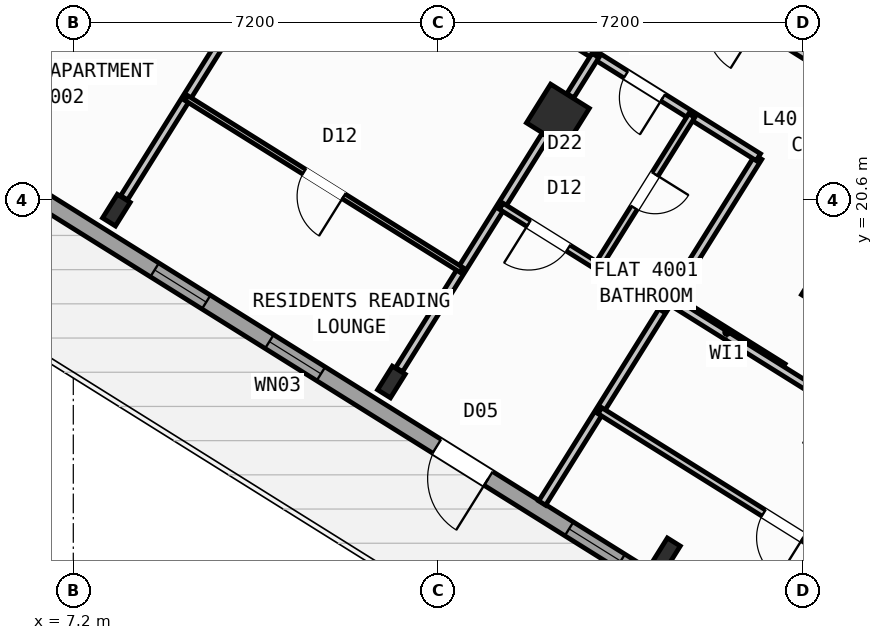
"""IFC4 building model, lengths in metres.
Left out: names, types, materials, properties, quantities, classifications, styles, units other than length and angle.
Written with IfcOpenShell. Run it as: python <this file> out.ifc"""

import sys

from ifc_helpers import new_model, si_unit, direction, frame, frame_2d, origin, origin_2d, place, context, subcontext, project, spatial, rectangle, hollow_rectangle, i_section, extrude, source, transform, mapped, element, fill, save


model = new_model("IFC4")
c1 = context("Model", 3, precision=1e-05, world=origin(), true_north=direction((0.0, 1.0)))
c2 = subcontext(c1, "Body", "Model", "MODEL_VIEW")
j1 = project(units=[si_unit("LENGTHUNIT", "METRE"), si_unit("PLANEANGLEUNIT", "RADIAN")], contexts=[c1])
p1 = place(None, origin())
s1 = spatial("IfcSite", under=j1, at=p1, CompositionType="ELEMENT")
p2 = place(p1, origin())
s2 = spatial("IfcBuilding", under=s1, at=p2, CompositionType="ELEMENT")
p3 = place(p2, frame((0.0, 0.0, 158.7)))
s3 = spatial("IfcBuildingStorey", under=s2, at=p3, CompositionType="ELEMENT", Elevation=158.7)
m1 = source(origin(), c2, "Body", "SweptSolid", [
    extrude(hollow_rectangle(XDim=0.9, YDim=0.9, WallThickness=0.036, at=origin_2d()), origin(), (0.0, 0.0, 1.0), 3.6),
])
p4 = place(p3, frame((22.191, 18.87, 0.0), z_axis=(0.0, 0.0, 1.0), x_axis=(-0.848048096156, 0.529919264233, 0.0)))
e1 = element("IfcColumn", 1, at=p4, inside=s3, PredefinedType="COLUMN", context=c2, shape_type="MappedRepresentation", body=[
    mapped(m1, transform((0.0, 0.0, 0.0), scale=1.0)),
])
m2 = source(origin(), c2, "Body", "SweptSolid", [
    extrude(i_section(OverallWidth=0.3, OverallDepth=0.55, WebThickness=0.015, FlangeThickness=0.029, at=origin_2d()), origin(), (0.0, 0.0, 1.0), 3.6),
])
p5 = place(p3, frame((18.906, 13.612, 0.0), z_axis=(0.0, 0.0, 1.0), x_axis=(-0.848048096156, 0.529919264233, 0.0)))
e2 = element("IfcColumn", 2, at=p5, inside=s3, PredefinedType="COLUMN", context=c2, shape_type="MappedRepresentation", body=[
    mapped(m2, transform((0.0, 0.0, 0.0), scale=1.0)),
])
p6 = place(p3, frame((16.764, 22.261, 0.0), z_axis=(0.0, 0.0, 1.0), x_axis=(-0.848048096156, 0.529919264233, 0.0)))
e3 = element("IfcColumn", 3, at=p6, inside=s3, PredefinedType="COLUMN", context=c2, shape_type="MappedRepresentation", body=[
    mapped(m1, transform((0.0, 0.0, 0.0), scale=1.0)),
])
for number, where, z_axis, x_axis in (
    (4, (13.478, 17.003, 0.0), (0.0, 0.0, 1.0), (-0.848, 0.53, 0.0)),
    (5, (8.051, 20.395, 0.0), (0.0, 0.0, 1.0), (-0.848, 0.53, 0.0)),
):
    element("IfcColumn", number, at=place(p3, frame(where, z_axis=z_axis, x_axis=x_axis)), inside=s3, PredefinedType="COLUMN", context=c2, shape_type="MappedRepresentation", body=[
        mapped(m2, transform((0.0, 0.0, 0.0), scale=1.0)),
    ])
p7 = place(p3, frame((29.268, 6.429, 0.0), z_axis=(0.0, 0.0, 1.0), x_axis=(-0.848049971435, 0.529916263149, 0.0)))
e6 = element("IfcWall", 6, at=p7, inside=s3, PredefinedType="STANDARD", context=c2, shape_type="SweptSolid", body=[
    extrude(rectangle(XDim=31.588, YDim=0.32, at=frame_2d((15.794, 0.0))), origin(), (0.0, 0.0, 1.0), 3.35),
])
p8 = place(p7, frame((16.362, 0.0, 0.0)))
e7 = element("IfcOpeningElement", 7, at=p8, cuts=e6, PredefinedType="OPENING", context=c2, shape_type="SweptSolid", body=[
    extrude(rectangle(XDim=1.2, YDim=2.15, at=frame_2d((0.6, 1.075))), frame((0.0, 0.17, 0.0), z_axis=(0.0, -1.0, 0.0), x_axis=(1.0, 0.0, 0.0)), (0.0, 0.0, 1.0), 0.34),
])
p9 = place(p7, frame((2.989, 0.0, 0.8)))
e8 = element("IfcOpeningElement", 8, at=p9, cuts=e6, PredefinedType="OPENING", context=c2, shape_type="SweptSolid", body=[
    extrude(rectangle(XDim=2.1, YDim=1.55, at=frame_2d((1.05, 0.775))), frame((0.0, 0.17, 0.0), z_axis=(0.0, -1.0, 0.0), x_axis=(1.0, 0.0, 0.0)), (0.0, 0.0, 1.0), 0.34),
])
p10 = place(p7, frame((8.359, 0.0, 0.8)))
e9 = element("IfcOpeningElement", 9, at=p10, cuts=e6, PredefinedType="OPENING", context=c2, shape_type="SweptSolid", body=[
    extrude(rectangle(XDim=2.1, YDim=1.55, at=frame_2d((1.05, 0.775))), frame((0.0, 0.17, 0.0), z_axis=(0.0, -1.0, 0.0), x_axis=(1.0, 0.0, 0.0)), (0.0, 0.0, 1.0), 0.34),
])
p11 = place(p7, frame((13.284, 0.0, 0.95)))
e10 = element("IfcOpeningElement", 10, at=p11, cuts=e6, PredefinedType="OPENING", context=c2, shape_type="SweptSolid", body=[
    extrude(rectangle(XDim=1.2, YDim=1.4, at=frame_2d((0.6, 0.7))), frame((0.0, 0.17, 0.0), z_axis=(0.0, -1.0, 0.0), x_axis=(1.0, 0.0, 0.0)), (0.0, 0.0, 1.0), 0.34),
])
p12 = place(p7, frame((20.259, 0.0, 0.95)))
e11 = element("IfcOpeningElement", 11, at=p12, cuts=e6, PredefinedType="OPENING", context=c2, shape_type="SweptSolid", body=[
    extrude(rectangle(XDim=1.2, YDim=1.4, at=frame_2d((0.6, 0.7))), frame((0.0, 0.17, 0.0), z_axis=(0.0, -1.0, 0.0), x_axis=(1.0, 0.0, 0.0)), (0.0, 0.0, 1.0), 0.34),
])
p13 = place(p7, frame((22.929, 0.0, 0.95)))
e12 = element("IfcOpeningElement", 12, at=p13, cuts=e6, PredefinedType="OPENING", context=c2, shape_type="SweptSolid", body=[
    extrude(rectangle(XDim=1.2, YDim=1.4, at=frame_2d((0.6, 0.7))), frame((0.0, 0.17, 0.0), z_axis=(0.0, -1.0, 0.0), x_axis=(1.0, 0.0, 0.0)), (0.0, 0.0, 1.0), 0.34),
])
p14 = place(p7, frame((27.481, 0.0, 0.8)))
e13 = element("IfcOpeningElement", 13, at=p14, cuts=e6, PredefinedType="OPENING", context=c2, shape_type="SweptSolid", body=[
    extrude(rectangle(XDim=2.1, YDim=1.55, at=frame_2d((1.05, 0.775))), frame((0.0, 0.17, 0.0), z_axis=(0.0, -1.0, 0.0), x_axis=(1.0, 0.0, 0.0)), (0.0, 0.0, 1.0), 0.34),
])
p15 = place(p3, frame((2.415, 23.452, 0.0), z_axis=(0.0, 0.0, 1.0), x_axis=(0.52991049553, 0.848053575387, 0.0)))
e14 = element("IfcWall", 14, at=p15, inside=s3, PredefinedType="STANDARD", context=c2, shape_type="SweptSolid", body=[
    extrude(rectangle(XDim=21.587, YDim=0.32, at=frame_2d((10.794, 0.0))), origin(), (0.0, 0.0, 1.0), 2.775),
])
p16 = place(p15, frame((1.406, 0.0, 0.8)))
e15 = element("IfcOpeningElement", 15, at=p16, cuts=e14, PredefinedType="OPENING", context=c2, shape_type="SweptSolid", body=[
    extrude(rectangle(XDim=2.1, YDim=1.55, at=frame_2d((1.05, 0.775))), frame((0.0, 0.17, 0.0), z_axis=(0.0, -1.0, 0.0), x_axis=(1.0, 0.0, 0.0)), (0.0, 0.0, 1.0), 0.34),
])
p17 = place(p15, frame((10.949, 0.0, 1.0)))
e16 = element("IfcOpeningElement", 16, at=p17, cuts=e14, PredefinedType="OPENING", context=c2, shape_type="SweptSolid", body=[
    extrude(rectangle(XDim=0.9, YDim=1.25, at=frame_2d((0.45, 0.625))), frame((0.0, 0.17, 0.0), z_axis=(0.0, -1.0, 0.0), x_axis=(1.0, 0.0, 0.0)), (0.0, 0.0, 1.0), 0.34),
])
p18 = place(p15, frame((15.369, 0.0, 0.85)))
e17 = element("IfcOpeningElement", 17, at=p18, cuts=e14, PredefinedType="OPENING", context=c2, shape_type="SweptSolid", body=[
    extrude(rectangle(XDim=1.5, YDim=1.5, at=frame_2d((0.75, 0.75))), frame((0.0, 0.17, 0.0), z_axis=(0.0, -1.0, 0.0), x_axis=(1.0, 0.0, 0.0)), (0.0, 0.0, 1.0), 0.34),
])
p19 = place(p15, frame((18.219, 0.0, 0.85)))
e18 = element("IfcOpeningElement", 18, at=p19, cuts=e14, PredefinedType="OPENING", context=c2, shape_type="SweptSolid", body=[
    extrude(rectangle(XDim=1.5, YDim=1.5, at=frame_2d((0.75, 0.75))), frame((0.0, 0.17, 0.0), z_axis=(0.0, -1.0, 0.0), x_axis=(1.0, 0.0, 0.0)), (0.0, 0.0, 1.0), 0.34),
])
p20 = place(p3, frame((21.206, 17.292, 0.0), z_axis=(0.0, 0.0, 1.0), x_axis=(-0.848050851465, 0.529914854792, 0.0)))
e19 = element("IfcWall", 19, at=p20, inside=s3, PredefinedType="PARTITIONING", context=c2, shape_type="SweptSolid", body=[
    extrude(rectangle(XDim=2.61, YDim=0.16, at=frame_2d((1.305, 0.0))), origin(), (0.0, 0.0, 1.0), 3.34),
])
p21 = place(p3, frame((20.719, 21.44, 0.0), z_axis=(0.0, 0.0, 1.0), x_axis=(-0.529906246318, -0.848056230514, 0.0)))
e20 = element("IfcWall", 20, at=p21, inside=s3, PredefinedType="PARTITIONING", context=c2, shape_type="SweptSolid", body=[
    extrude(rectangle(XDim=8.05, YDim=0.16, at=frame_2d((4.025, 0.0))), origin(), (0.0, 0.0, 1.0), 3.34),
])
p22 = place(p3, frame((21.885, 23.306, 0.0), z_axis=(0.0, 0.0, 1.0), x_axis=(-0.848052408131, 0.529912363569, 0.0)))
e21 = element("IfcWall", 21, at=p22, inside=s3, PredefinedType="PARTITIONING", context=c2, shape_type="SweptSolid", body=[
    extrude(rectangle(XDim=16.73, YDim=0.16, at=frame_2d((8.365, 0.0))), origin(), (0.0, 0.0, 1.0), 3.34),
])
p23 = place(p22, frame((1.395, 0.0, 0.0)))
e22 = element("IfcOpeningElement", 22, at=p23, cuts=e21, PredefinedType="OPENING", context=c2, shape_type="SweptSolid", body=[
    extrude(rectangle(XDim=1.0, YDim=2.1, at=frame_2d((0.5, 1.05))), frame((0.0, 0.09, 0.0), z_axis=(0.0, -1.0, 0.0), x_axis=(1.0, 0.0, 0.0)), (0.0, 0.0, 1.0), 0.18),
])
p24 = place(p22, frame((7.82, 0.0, 0.0)))
e23 = element("IfcOpeningElement", 23, at=p24, cuts=e21, PredefinedType="OPENING", context=c2, shape_type="SweptSolid", body=[
    extrude(rectangle(XDim=1.0, YDim=2.1, at=frame_2d((0.5, 1.05))), frame((0.0, 0.09, 0.0), z_axis=(0.0, -1.0, 0.0), x_axis=(1.0, 0.0, 0.0)), (0.0, 0.0, 1.0), 0.18),
])
p25 = place(p22, frame((11.14, 0.0, 0.0)))
e24 = element("IfcOpeningElement", 24, at=p25, cuts=e21, PredefinedType="OPENING", context=c2, shape_type="SweptSolid", body=[
    extrude(rectangle(XDim=1.0, YDim=2.1, at=frame_2d((0.5, 1.05))), frame((0.0, 0.09, 0.0), z_axis=(0.0, -1.0, 0.0), x_axis=(1.0, 0.0, 0.0)), (0.0, 0.0, 1.0), 0.18),
])
p26 = place(p3, frame((20.719, 21.44, 0.0), z_axis=(0.0, 0.0, 1.0), x_axis=(-0.848048310262, 0.529918921593, 0.0)))
e25 = element("IfcWall", 25, at=p26, inside=s3, PredefinedType="PARTITIONING", context=c2, shape_type="SweptSolid", body=[
    extrude(rectangle(XDim=16.73, YDim=0.16, at=frame_2d((8.365, 0.0))), origin(), (0.0, 0.0, 1.0), 3.34),
])
p27 = place(p26, frame((2.22, 0.0, 0.0)))
e26 = element("IfcOpeningElement", 26, at=p27, cuts=e25, PredefinedType="OPENING", context=c2, shape_type="SweptSolid", body=[
    extrude(rectangle(XDim=0.86, YDim=2.05, at=frame_2d((0.43, 1.025))), frame((0.0, 0.09, 0.0), z_axis=(0.0, -1.0, 0.0), x_axis=(1.0, 0.0, 0.0)), (0.0, 0.0, 1.0), 0.18),
])
p28 = place(p26, frame((6.49, 0.0, 0.0)))
e27 = element("IfcOpeningElement", 27, at=p28, cuts=e25, PredefinedType="OPENING", context=c2, shape_type="SweptSolid", body=[
    extrude(rectangle(XDim=1.0, YDim=2.1, at=frame_2d((0.5, 1.05))), frame((0.0, 0.09, 0.0), z_axis=(0.0, -1.0, 0.0), x_axis=(1.0, 0.0, 0.0)), (0.0, 0.0, 1.0), 0.18),
])
p29 = place(p26, frame((14.304, 0.0, 0.0)))
e28 = element("IfcOpeningElement", 28, at=p29, cuts=e25, PredefinedType="OPENING", context=c2, shape_type="SweptSolid", body=[
    extrude(rectangle(XDim=1.0, YDim=2.1, at=frame_2d((0.5, 1.05))), frame((0.0, 0.09, 0.0), z_axis=(0.0, -1.0, 0.0), x_axis=(1.0, 0.0, 0.0)), (0.0, 0.0, 1.0), 0.18),
])
p30 = place(p3, frame((17.506, 23.449, 0.0), z_axis=(0.0, 0.0, 1.0), x_axis=(-0.529835187763, -0.848100627171, 0.0)))
e29 = element("IfcWall", 29, at=p30, inside=s3, PredefinedType="PARTITIONING", context=c2, shape_type="SweptSolid", body=[
    extrude(rectangle(XDim=0.938, YDim=0.16, at=frame_2d((0.469, 0.0))), origin(), (0.0, 0.0, 1.0), 2.775),
])
p31 = place(p3, frame((16.519, 21.87, 0.0), z_axis=(0.0, 0.0, 1.0), x_axis=(-0.529922447305, -0.848046107144, 0.0)))
e30 = element("IfcWall", 30, at=p31, inside=s3, PredefinedType="PARTITIONING", context=c2, shape_type="SweptSolid", body=[
    extrude(rectangle(XDim=5.451, YDim=0.16, at=frame_2d((2.726, 0.0))), origin(), (0.0, 0.0, 1.0), 2.775),
])
p32 = place(p3, frame((18.86, 18.464, 0.0), z_axis=(0.0, 0.0, 1.0), x_axis=(-0.848059820872, 0.529900500304, 0.0)))
e31 = element("IfcWall", 31, at=p32, inside=s3, PredefinedType="PLUMBINGWALL", context=c2, shape_type="SweptSolid", body=[
    extrude(rectangle(XDim=3.79, YDim=0.14, at=frame_2d((1.895, 0.0))), origin(), (0.0, 0.0, 1.0), 3.34),
])
p33 = place(p32, frame((2.23, 0.0, 0.0)))
e32 = element("IfcOpeningElement", 32, at=p33, cuts=e31, PredefinedType="OPENING", context=c2, shape_type="SweptSolid", body=[
    extrude(rectangle(XDim=0.92, YDim=2.08, at=frame_2d((0.46, 1.04))), frame((0.0, 0.08, 0.0), z_axis=(0.0, -1.0, 0.0), x_axis=(1.0, 0.0, 0.0)), (0.0, 0.0, 1.0), 0.16),
])
p34 = place(p3, frame((19.405, 22.261, 0.0), z_axis=(0.0, 0.0, 1.0), x_axis=(-0.529898896701, -0.848060822863, 0.0)))
e33 = element("IfcWall", 33, at=p34, inside=s3, PredefinedType="PLUMBINGWALL", context=c2, shape_type="SweptSolid", body=[
    extrude(rectangle(XDim=3.51, YDim=0.14, at=frame_2d((1.755, 0.0))), origin(), (0.0, 0.0, 1.0), 2.995),
])
p35 = place(p34, frame((1.365, 0.0, 0.0)))
e34 = element("IfcOpeningElement", 34, at=p35, cuts=e33, PredefinedType="OPENING", context=c2, shape_type="SweptSolid", body=[
    extrude(rectangle(XDim=0.78, YDim=2.05, at=frame_2d((0.39, 1.025))), frame((0.0, 0.08, 0.0), z_axis=(0.0, -1.0, 0.0), x_axis=(1.0, 0.0, 0.0)), (0.0, 0.0, 1.0), 0.16),
])
p36 = place(p3, frame((11.091, 25.261, 0.0), z_axis=(0.0, 0.0, 1.0), x_axis=(-0.52994257524, -0.848033529377, 0.0)))
e35 = element("IfcWall", 35, at=p36, inside=s3, PredefinedType="PARTITIONING", context=c2, shape_type="SweptSolid", body=[
    extrude(rectangle(XDim=5.451, YDim=0.16, at=frame_2d((2.726, 0.0))), origin(), (0.0, 0.0, 1.0), 2.775),
])
p37 = place(p3, frame((14.86, 19.215, 0.0), z_axis=(0.0, 0.0, 1.0), x_axis=(-0.848039019877, 0.529933789039, 0.0)))
e36 = element("IfcWall", 36, at=p37, inside=s3, PredefinedType="PARTITIONING", context=c2, shape_type="SweptSolid", body=[
    extrude(rectangle(XDim=6.4, YDim=0.11, at=frame_2d((3.2, 0.0))), origin(), (0.0, 0.0, 1.0), 3.34),
])
p38 = place(p37, frame((2.74, 0.0, 0.0)))
e37 = element("IfcOpeningElement", 37, at=p38, cuts=e36, PredefinedType="OPENING", context=c2, shape_type="SweptSolid", body=[
    extrude(rectangle(XDim=0.92, YDim=2.08, at=frame_2d((0.46, 1.04))), frame((0.0, 0.065, 0.0), z_axis=(0.0, -1.0, 0.0), x_axis=(1.0, 0.0, 0.0)), (0.0, 0.0, 1.0), 0.13),
])
p39 = place(p3, frame((32.164, 10.374, 0.0), z_axis=(0.0, 0.0, 1.0), x_axis=(-0.848044107957, 0.529925646633, 0.0)))
e38 = element("IfcWall", 38, at=p39, inside=s3, PredefinedType="PARTITIONING", context=c2, shape_type="SweptSolid", body=[
    extrude(rectangle(XDim=15.57, YDim=0.16, at=frame_2d((7.785, 0.0))), origin(), (0.0, 0.0, 1.0), 3.34),
])
p40 = place(p39, frame((10.83, 0.0, 0.0)))
e39 = element("IfcOpeningElement", 39, at=p40, cuts=e38, PredefinedType="OPENING", context=c2, shape_type="SweptSolid", body=[
    extrude(rectangle(XDim=1.0, YDim=2.1, at=frame_2d((0.5, 1.05))), frame((0.0, 0.09, 0.0), z_axis=(0.0, -1.0, 0.0), x_axis=(1.0, 0.0, 0.0)), (0.0, 0.0, 1.0), 0.18),
])
p41 = place(p3, frame((29.72, 8.859, 0.0), z_axis=(0.0, 0.0, 1.0), x_axis=(-0.848049134363, 0.529917602752, 0.0)))
e40 = element("IfcWall", 40, at=p41, inside=s3, PredefinedType="PLUMBINGWALL", context=c2, shape_type="SweptSolid", body=[
    extrude(rectangle(XDim=14.3, YDim=0.14, at=frame_2d((7.15, 0.0))), origin(), (0.0, 0.0, 1.0), 3.34),
])
p42 = place(p41, frame((9.57, 0.0, 0.0)))
e41 = element("IfcOpeningElement", 41, at=p42, cuts=e40, PredefinedType="OPENING", context=c2, shape_type="SweptSolid", body=[
    extrude(rectangle(XDim=0.92, YDim=2.08, at=frame_2d((0.46, 1.04))), frame((0.0, 0.08, 0.0), z_axis=(0.0, -1.0, 0.0), x_axis=(1.0, 0.0, 0.0)), (0.0, 0.0, 1.0), 0.16),
])
m3 = source(origin(), c2, "Body", "SweptSolid", [
    extrude(rectangle(XDim=1.2, YDim=2.15, at=frame_2d((0.6, 1.075))), frame((0.0, 0.025, 0.0), z_axis=(0.0, -1.0, 0.0), x_axis=(1.0, 0.0, 0.0)), (0.0, 0.0, 1.0), 0.05),
])
p43 = place(p8, origin())
e42 = element("IfcDoor", 42, at=p43, inside=s3, OperationType="SINGLE_SWING_LEFT", PredefinedType="DOOR", context=c2, shape_type="MappedRepresentation", body=[
    mapped(m3, transform((0.0, 0.0, 0.0), scale=1.0)),
])
fill(e7, e42)
m4 = source(origin(), c2, "Body", "SweptSolid", [
    extrude(rectangle(XDim=1.2, YDim=1.4, at=frame_2d((0.6, 0.7))), frame((0.0, 0.03, 0.0), z_axis=(0.0, -1.0, 0.0), x_axis=(1.0, 0.0, 0.0)), (0.0, 0.0, 1.0), 0.06),
])
p44 = place(p11, origin())
e43 = element("IfcWindow", 43, at=p44, inside=s3, PartitioningType="SINGLE_PANEL", PredefinedType="WINDOW", context=c2, shape_type="MappedRepresentation", body=[
    mapped(m4, transform((0.0, 0.0, 0.0), scale=1.0)),
])
fill(e10, e43)
p45 = place(p12, origin())
e44 = element("IfcWindow", 44, at=p45, inside=s3, PartitioningType="SINGLE_PANEL", PredefinedType="WINDOW", context=c2, shape_type="MappedRepresentation", body=[
    mapped(m4, transform((0.0, 0.0, 0.0), scale=1.0)),
])
fill(e11, e44)
p46 = place(p13, origin())
e45 = element("IfcWindow", 45, at=p46, inside=s3, PartitioningType="SINGLE_PANEL", PredefinedType="WINDOW", context=c2, shape_type="MappedRepresentation", body=[
    mapped(m4, transform((0.0, 0.0, 0.0), scale=1.0)),
])
fill(e12, e45)
m5 = source(origin(), c2, "Body", "SweptSolid", [
    extrude(rectangle(XDim=0.86, YDim=2.05, at=frame_2d((0.43, 1.025))), frame((0.0, 0.025, 0.0), z_axis=(0.0, -1.0, 0.0), x_axis=(1.0, 0.0, 0.0)), (0.0, 0.0, 1.0), 0.05),
])
p47 = place(p27, origin())
e46 = element("IfcDoor", 46, at=p47, inside=s3, OperationType="SINGLE_SWING_LEFT", PredefinedType="DOOR", context=c2, shape_type="MappedRepresentation", body=[
    mapped(m5, transform((0.0, 0.0, 0.0), scale=1.0)),
])
fill(e26, e46)
m6 = source(origin(), c2, "Body", "SweptSolid", [
    extrude(rectangle(XDim=0.92, YDim=2.08, at=frame_2d((0.46, 1.04))), frame((0.0, 0.025, 0.0), z_axis=(0.0, -1.0, 0.0), x_axis=(1.0, 0.0, 0.0)), (0.0, 0.0, 1.0), 0.05),
])
p48 = place(p33, origin())
e47 = element("IfcDoor", 47, at=p48, inside=s3, OperationType="SINGLE_SWING_RIGHT", PredefinedType="DOOR", context=c2, shape_type="MappedRepresentation", body=[
    mapped(m6, transform((0.0, 0.0, 0.0), scale=1.0)),
])
fill(e32, e47)
m7 = source(origin(), c2, "Body", "SweptSolid", [
    extrude(rectangle(XDim=0.78, YDim=2.05, at=frame_2d((0.39, 1.025))), frame((0.0, 0.025, 0.0), z_axis=(0.0, -1.0, 0.0), x_axis=(1.0, 0.0, 0.0)), (0.0, 0.0, 1.0), 0.05),
])
p49 = place(p35, origin())
e48 = element("IfcDoor", 48, at=p49, inside=s3, OperationType="SINGLE_SWING_LEFT", PredefinedType="DOOR", context=c2, shape_type="MappedRepresentation", body=[
    mapped(m7, transform((0.0, 0.0, 0.0), scale=1.0)),
])
fill(e34, e48)
p50 = place(p38, origin())
e49 = element("IfcDoor", 49, at=p50, inside=s3, OperationType="SINGLE_SWING_LEFT", PredefinedType="DOOR", context=c2, shape_type="MappedRepresentation", body=[
    mapped(m6, transform((0.0, 0.0, 0.0), scale=1.0)),
])
fill(e37, e49)
p51 = place(p42, origin())
e50 = element("IfcDoor", 50, at=p51, inside=s3, OperationType="SINGLE_SWING_LEFT", PredefinedType="DOOR", context=c2, shape_type="MappedRepresentation", body=[
    mapped(m6, transform((0.0, 0.0, 0.0), scale=1.0)),
])
fill(e41, e50)
save(model, sys.argv[1])
